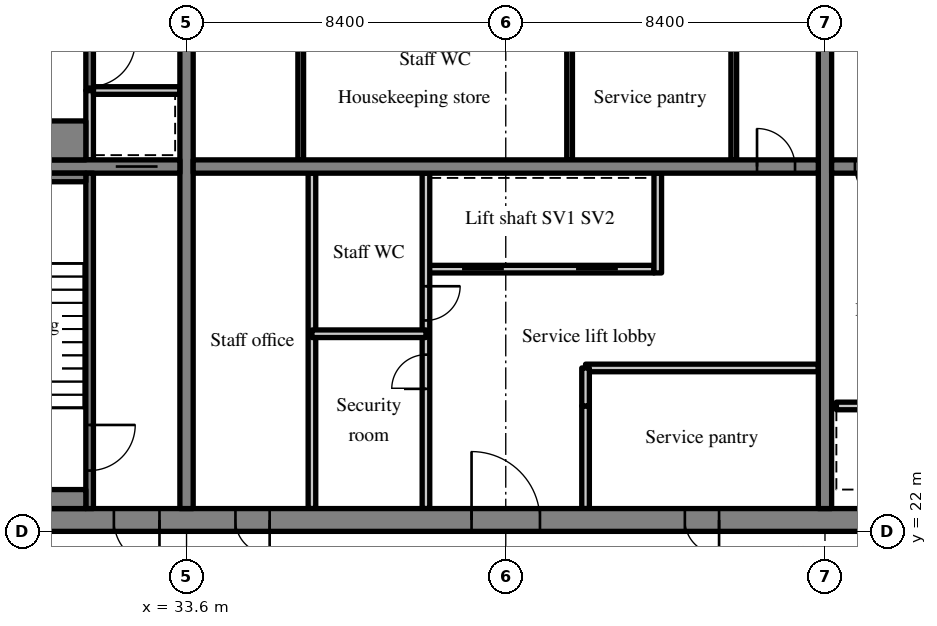
"""IFC4 building model, lengths in metres.
Left out: names, types, materials, properties, quantities, classifications, styles, units other than length and angle.
Written with IfcOpenShell. Run it as: python <this file> out.ifc"""

import sys

from ifc_helpers import new_model, si_unit, direction, frame, frame_2d, origin, place, context, subcontext, project, spatial, rectangle, extrude, source, transform, mapped, element, fill, save


model = new_model("IFC4")
c1 = context("Model", 3, precision=1e-05, world=origin(), true_north=direction((0.0, 1.0)))
c2 = subcontext(c1, "Body", "Model", "MODEL_VIEW")
j1 = project(units=[si_unit("LENGTHUNIT", "METRE"), si_unit("PLANEANGLEUNIT", "RADIAN")], contexts=[c1])
p1 = place(None, origin())
s1 = spatial("IfcSite", under=j1, at=p1, CompositionType="ELEMENT")
p2 = place(p1, origin())
s2 = spatial("IfcBuilding", under=s1, at=p2, CompositionType="ELEMENT")
p3 = place(p2, frame((0.0, 0.0, 245.2)))
s3 = spatial("IfcBuildingStorey", under=s2, at=p3, CompositionType="ELEMENT", Elevation=245.2)
m1 = source(origin(), c2, "Body", "SweptSolid", [
    extrude(rectangle(XDim=50.4, YDim=0.6, at=frame_2d((25.2, 0.0))), origin(), (0.0, 0.0, 1.0), 3.62),
])
p4 = place(p3, frame((25.2, 22.3, 0.0), z_axis=(0.0, 0.0, 1.0), x_axis=(1.0, 0.0, 0.0)))
e1 = element("IfcWall", 1, at=p4, inside=s3, PredefinedType="SHEAR", context=c2, shape_type="MappedRepresentation", body=[
    mapped(m1, transform((0.0, 0.0, 0.0), scale=1.0)),
])
m2 = source(origin(), c2, "Body", "SweptSolid", [
    extrude(rectangle(XDim=1.8, YDim=2.1, at=frame_2d((0.9, 1.05))), frame((0.0, 0.31, 0.0), z_axis=(0.0, -1.0, 0.0), x_axis=(1.0, 0.0, 0.0)), (0.0, 0.0, 1.0), 0.62),
])
p5 = place(p4, frame((15.9, 0.0, 0.0)))
e2 = element("IfcOpeningElement", 2, at=p5, cuts=e1, PredefinedType="OPENING", context=c2, shape_type="MappedRepresentation", body=[
    mapped(m2, transform((0.0, 0.0, 0.0), scale=1.0)),
])
m3 = source(origin(), c2, "Body", "SweptSolid", [
    extrude(rectangle(XDim=0.9, YDim=2.1, at=frame_2d((0.45, 1.05))), frame((0.0, 0.31, 0.0), z_axis=(0.0, -1.0, 0.0), x_axis=(1.0, 0.0, 0.0)), (0.0, 0.0, 1.0), 0.62),
])
p6 = place(p4, frame((9.687, 0.0, 0.0)))
e3 = element("IfcOpeningElement", 3, at=p6, cuts=e1, PredefinedType="OPENING", context=c2, shape_type="MappedRepresentation", body=[
    mapped(m3, transform((0.0, 0.0, 0.0), scale=1.0)),
])
p7 = place(p4, frame((21.513, 0.0, 0.0)))
e4 = element("IfcOpeningElement", 4, at=p7, cuts=e1, PredefinedType="OPENING", context=c2, shape_type="MappedRepresentation", body=[
    mapped(m3, transform((0.0, 0.0, 0.0), scale=1.0)),
])
p8 = place(p4, frame((32.7, 0.0, 0.0)))
e5 = element("IfcOpeningElement", 5, at=p8, cuts=e1, PredefinedType="OPENING", context=c2, shape_type="MappedRepresentation", body=[
    mapped(m2, transform((0.0, 0.0, 0.0), scale=1.0)),
])
m4 = source(origin(), c2, "Body", "SweptSolid", [
    extrude(rectangle(XDim=1.2, YDim=2.1, at=frame_2d((0.6, 1.05))), frame((0.0, 0.31, 0.0), z_axis=(0.0, -1.0, 0.0), x_axis=(1.0, 0.0, 0.0)), (0.0, 0.0, 1.0), 0.62),
])
p9 = place(p4, frame((6.488, 0.0, 0.0)))
e6 = element("IfcOpeningElement", 6, at=p9, cuts=e1, PredefinedType="OPENING", context=c2, shape_type="MappedRepresentation", body=[
    mapped(m4, transform((0.0, 0.0, 0.0), scale=1.0)),
])
p10 = place(p4, frame((47.925, 0.0, 0.0)))
e7 = element("IfcOpeningElement", 7, at=p10, cuts=e1, PredefinedType="OPENING", context=c2, shape_type="MappedRepresentation", body=[
    mapped(m4, transform((0.0, 0.0, 0.0), scale=1.0)),
])
m5 = source(origin(), c2, "Body", "SweptSolid", [
    extrude(rectangle(XDim=18.8, YDim=0.35, at=frame_2d((9.4, 0.0))), origin(), (0.0, 0.0, 1.0), 3.62),
])
p11 = place(p3, frame((33.6, 22.6, 0.0), z_axis=(0.0, 0.0, 1.0), x_axis=(0.0, 1.0, 0.0)))
e8 = element("IfcWall", 8, at=p11, inside=s3, PredefinedType="SHEAR", context=c2, shape_type="MappedRepresentation", body=[
    mapped(m5, transform((0.0, 0.0, 0.0), scale=1.0)),
])
m6 = source(origin(), c2, "Body", "SweptSolid", [
    extrude(rectangle(XDim=1.1, YDim=2.1, at=frame_2d((0.55, 1.05))), frame((0.0, 0.185, 0.0), z_axis=(0.0, -1.0, 0.0), x_axis=(1.0, 0.0, 0.0)), (0.0, 0.0, 1.0), 0.37),
])
p12 = place(p11, frame((12.85, 0.0, 0.0)))
e9 = element("IfcOpeningElement", 9, at=p12, cuts=e8, PredefinedType="OPENING", context=c2, shape_type="MappedRepresentation", body=[
    mapped(m6, transform((0.0, 0.0, 0.0), scale=1.0)),
])
p13 = place(p3, frame((50.4, 22.6, 0.0), z_axis=(0.0, 0.0, 1.0), x_axis=(0.0, 1.0, 0.0)))
e10 = element("IfcWall", 10, at=p13, inside=s3, PredefinedType="SHEAR", context=c2, shape_type="MappedRepresentation", body=[
    mapped(m5, transform((0.0, 0.0, 0.0), scale=1.0)),
])
p14 = place(p13, frame((12.85, 0.0, 0.0)))
e11 = element("IfcOpeningElement", 11, at=p14, cuts=e10, PredefinedType="OPENING", context=c2, shape_type="MappedRepresentation", body=[
    mapped(m6, transform((0.0, 0.0, 0.0), scale=1.0)),
])
m7 = source(origin(), c2, "Body", "SweptSolid", [
    extrude(rectangle(XDim=7.625, YDim=0.35, at=frame_2d((3.812, 0.0))), origin(), (0.0, 0.0, 1.0), 3.62),
])
p15 = place(p3, frame((25.8, 31.6, 0.0), z_axis=(0.0, 0.0, 1.0), x_axis=(1.0, 0.0, 0.0)))
e12 = element("IfcWall", 12, at=p15, inside=s3, PredefinedType="SHEAR", context=c2, shape_type="MappedRepresentation", body=[
    mapped(m7, transform((0.0, 0.0, 0.0), scale=1.0)),
])
p16 = place(p15, frame((5.938, 0.0, 0.0)))
e13 = element("IfcOpeningElement", 13, at=p16, cuts=e12, PredefinedType="OPENING", context=c2, shape_type="MappedRepresentation", body=[
    mapped(m6, transform((0.0, 0.0, 0.0), scale=1.0)),
])
m8 = source(origin(), c2, "Body", "SweptSolid", [
    extrude(rectangle(XDim=16.45, YDim=0.35, at=frame_2d((8.225, 0.0))), origin(), (0.0, 0.0, 1.0), 3.62),
])
p17 = place(p3, frame((33.775, 31.6, 0.0), z_axis=(0.0, 0.0, 1.0), x_axis=(1.0, 0.0, 0.0)))
e14 = element("IfcWall", 14, at=p17, inside=s3, PredefinedType="SHEAR", context=c2, shape_type="MappedRepresentation", body=[
    mapped(m8, transform((0.0, 0.0, 0.0), scale=1.0)),
])
m9 = source(origin(), c2, "Body", "SweptSolid", [
    extrude(rectangle(XDim=1.0, YDim=2.1, at=frame_2d((0.5, 1.05))), frame((0.0, 0.185, 0.0), z_axis=(0.0, -1.0, 0.0), x_axis=(1.0, 0.0, 0.0)), (0.0, 0.0, 1.0), 0.37),
])
p18 = place(p17, frame((14.837, 0.0, 0.0)))
e15 = element("IfcOpeningElement", 15, at=p18, cuts=e14, PredefinedType="OPENING", context=c2, shape_type="MappedRepresentation", body=[
    mapped(m9, transform((0.0, 0.0, 0.0), scale=1.0)),
])
m10 = source(origin(), c2, "Body", "SweptSolid", [
    extrude(rectangle(XDim=16.45, YDim=0.35, at=frame_2d((8.225, 0.0))), origin(), (0.0, 0.0, 1.0), 3.62),
])
p19 = place(p3, frame((50.575, 31.6, 0.0), z_axis=(0.0, 0.0, 1.0), x_axis=(1.0, 0.0, 0.0)))
e16 = element("IfcWall", 16, at=p19, inside=s3, PredefinedType="SHEAR", context=c2, shape_type="MappedRepresentation", body=[
    mapped(m10, transform((0.0, 0.0, 0.0), scale=1.0)),
])
p20 = place(p19, frame((0.613, 0.0, 0.0)))
e17 = element("IfcOpeningElement", 17, at=p20, cuts=e16, PredefinedType="OPENING", context=c2, shape_type="MappedRepresentation", body=[
    mapped(m9, transform((0.0, 0.0, 0.0), scale=1.0)),
])
m11 = source(origin(), c2, "Body", "SweptSolid", [
    extrude(rectangle(XDim=6.0, YDim=0.2, at=frame_2d((3.0, 0.0))), origin(), (0.0, 0.0, 1.0), 3.62),
])
p21 = place(p3, frame((39.9, 28.9, 0.0), z_axis=(0.0, 0.0, 1.0), x_axis=(1.0, 0.0, 0.0)))
e18 = element("IfcWall", 18, at=p21, inside=s3, PredefinedType="SOLIDWALL", context=c2, shape_type="MappedRepresentation", body=[
    mapped(m11, transform((0.0, 0.0, 0.0), scale=1.0)),
])
m12 = source(origin(), c2, "Body", "SweptSolid", [
    extrude(rectangle(XDim=1.1, YDim=2.1, at=frame_2d((0.55, 1.05))), frame((0.0, 0.11, 0.0), z_axis=(0.0, -1.0, 0.0), x_axis=(1.0, 0.0, 0.0)), (0.0, 0.0, 1.0), 0.22),
])
p22 = place(p21, frame((0.95, 0.0, 0.0)))
e19 = element("IfcOpeningElement", 19, at=p22, cuts=e18, PredefinedType="OPENING", context=c2, shape_type="MappedRepresentation", body=[
    mapped(m12, transform((0.0, 0.0, 0.0), scale=1.0)),
])
p23 = place(p21, frame((3.95, 0.0, 0.0)))
e20 = element("IfcOpeningElement", 20, at=p23, cuts=e18, PredefinedType="OPENING", context=c2, shape_type="MappedRepresentation", body=[
    mapped(m12, transform((0.0, 0.0, 0.0), scale=1.0)),
])
m13 = source(origin(), c2, "Body", "SweptSolid", [
    extrude(rectangle(XDim=8.825, YDim=0.2, at=frame_2d((4.413, 0.0))), origin(), (0.0, 0.0, 1.0), 3.62),
])
p24 = place(p3, frame((39.9, 22.6, 0.0), z_axis=(0.0, 0.0, 1.0), x_axis=(0.0, 1.0, 0.0)))
e21 = element("IfcWall", 21, at=p24, inside=s3, PredefinedType="PARTITIONING", context=c2, shape_type="MappedRepresentation", body=[
    mapped(m13, transform((0.0, 0.0, 0.0), scale=1.0)),
])
m14 = source(origin(), c2, "Body", "SweptSolid", [
    extrude(rectangle(XDim=0.9, YDim=2.1, at=frame_2d((0.45, 1.05))), frame((0.0, 0.11, 0.0), z_axis=(0.0, -1.0, 0.0), x_axis=(1.0, 0.0, 0.0)), (0.0, 0.0, 1.0), 0.22),
])
p25 = place(p24, frame((3.15, 0.0, 0.0)))
e22 = element("IfcOpeningElement", 22, at=p25, cuts=e21, PredefinedType="OPENING", context=c2, shape_type="MappedRepresentation", body=[
    mapped(m14, transform((0.0, 0.0, 0.0), scale=1.0)),
])
p26 = place(p24, frame((4.95, 0.0, 0.0)))
e23 = element("IfcOpeningElement", 23, at=p26, cuts=e21, PredefinedType="OPENING", context=c2, shape_type="MappedRepresentation", body=[
    mapped(m14, transform((0.0, 0.0, 0.0), scale=1.0)),
])
m15 = source(origin(), c2, "Body", "SweptSolid", [
    extrude(rectangle(XDim=2.7, YDim=0.2, at=frame_2d((1.35, 0.0))), origin(), (0.0, 0.0, 1.0), 3.62),
])
p27 = place(p3, frame((44.1, 22.6, 0.0), z_axis=(0.0, 0.0, 1.0), x_axis=(0.0, 1.0, 0.0)))
e24 = element("IfcWall", 24, at=p27, inside=s3, PredefinedType="PARTITIONING", context=c2, shape_type="MappedRepresentation", body=[
    mapped(m15, transform((0.0, 0.0, 0.0), scale=1.0)),
])
m16 = source(origin(), c2, "Body", "SweptSolid", [
    extrude(rectangle(XDim=2.625, YDim=0.2, at=frame_2d((1.312, 0.0))), origin(), (0.0, 0.0, 1.0), 3.62),
])
p28 = place(p3, frame((46.0, 28.8, 0.0), z_axis=(0.0, 0.0, 1.0), x_axis=(0.0, 1.0, 0.0)))
e25 = element("IfcWall", 25, at=p28, inside=s3, PredefinedType="SOLIDWALL", context=c2, shape_type="MappedRepresentation", body=[
    mapped(m16, transform((0.0, 0.0, 0.0), scale=1.0)),
])
p29 = place(p3, frame((36.9, 22.6, 0.0), z_axis=(0.0, 0.0, 1.0), x_axis=(0.0, 1.0, 0.0)))
e26 = element("IfcWall", 26, at=p29, inside=s3, PredefinedType="PARTITIONING", context=c2, shape_type="MappedRepresentation", body=[
    mapped(m13, transform((0.0, 0.0, 0.0), scale=1.0)),
])
m17 = source(origin(), c2, "Body", "SweptSolid", [
    extrude(rectangle(XDim=3.0, YDim=0.2, at=frame_2d((1.5, 0.0))), origin(), (0.0, 0.0, 1.0), 3.62),
])
p30 = place(p3, frame((36.9, 27.2, 0.0), z_axis=(0.0, 0.0, 1.0), x_axis=(1.0, 0.0, 0.0)))
e27 = element("IfcWall", 27, at=p30, inside=s3, PredefinedType="PARTITIONING", context=c2, shape_type="MappedRepresentation", body=[
    mapped(m17, transform((0.0, 0.0, 0.0), scale=1.0)),
])
m18 = source(origin(), c2, "Body", "SweptSolid", [
    extrude(rectangle(XDim=6.125, YDim=0.2, at=frame_2d((3.062, 0.0))), origin(), (0.0, 0.0, 1.0), 3.62),
])
p31 = place(p3, frame((44.1, 26.3, 0.0), z_axis=(0.0, 0.0, 1.0), x_axis=(1.0, 0.0, 0.0)))
e28 = element("IfcWall", 28, at=p31, inside=s3, PredefinedType="PARTITIONING", context=c2, shape_type="MappedRepresentation", body=[
    mapped(m18, transform((0.0, 0.0, 0.0), scale=1.0)),
])
m19 = source(origin(), c2, "Body", "SweptSolid", [
    extrude(rectangle(XDim=1.0, YDim=0.2, at=frame_2d((0.5, 0.0))), origin(), (0.0, 0.0, 1.0), 3.62),
])
p32 = place(p3, frame((44.1, 25.3, 0.0), z_axis=(0.0, 0.0, 1.0), x_axis=(0.0, 1.0, 0.0)))
e29 = element("IfcWall", 29, at=p32, inside=s3, PredefinedType="PARTITIONING", context=c2, shape_type="MappedRepresentation", body=[
    mapped(m19, transform((0.0, 0.0, 0.0), scale=1.0)),
])
m20 = source(origin(), c2, "Body", "SweptSolid", [
    extrude(rectangle(XDim=3.225, YDim=0.15, at=frame_2d((1.613, 0.0))), origin(), (0.0, 0.0, 1.0), 3.62),
])
for number, where, z_axis, x_axis in (
    (30, (48.0, 31.775, 0.0), (0.0, 0.0, 1.0), (0.0, 1.0, 0.0)),
    (31, (36.605, 31.775, 0.0), (0.0, 0.0, 1.0), (0.0, 1.0, 0.0)),
    (32, (43.68, 31.775, 0.0), (0.0, 0.0, 1.0), (0.0, 1.0, 0.0)),
):
    element("IfcWall", number, at=place(p3, frame(where, z_axis=z_axis, x_axis=x_axis)), inside=s3, PredefinedType="PARTITIONING", context=c2, shape_type="MappedRepresentation", body=[
        mapped(m20, transform((0.0, 0.0, 0.0), scale=1.0)),
    ])
p33 = place(p3, frame((56.7, 25.3, 0.0), z_axis=(0.0, 0.0, 1.0), x_axis=(-1.0, 0.0, 0.0)))
e33 = element("IfcWall", 33, at=p33, inside=s3, PredefinedType="SOLIDWALL", context=c2, shape_type="MappedRepresentation", body=[
    mapped(m11, transform((0.0, 0.0, 0.0), scale=1.0)),
])
p34 = place(p33, frame((0.95, 0.0, 0.0)))
e34 = element("IfcOpeningElement", 34, at=p34, cuts=e33, PredefinedType="OPENING", context=c2, shape_type="MappedRepresentation", body=[
    mapped(m12, transform((0.0, 0.0, 0.0), scale=1.0)),
])
p35 = place(p33, frame((3.95, 0.0, 0.0)))
e35 = element("IfcOpeningElement", 35, at=p35, cuts=e33, PredefinedType="OPENING", context=c2, shape_type="MappedRepresentation", body=[
    mapped(m12, transform((0.0, 0.0, 0.0), scale=1.0)),
])
m21 = source(origin(), c2, "Body", "SweptSolid", [
    extrude(rectangle(XDim=8.825, YDim=0.2, at=frame_2d((4.413, 0.0))), origin(), (0.0, 0.0, 1.0), 3.62),
])
p36 = place(p3, frame((31.05, 22.6, 0.0), z_axis=(0.0, 0.0, 1.0), x_axis=(0.0, 1.0, 0.0)))
e36 = element("IfcWall", 36, at=p36, inside=s3, PredefinedType="SOLIDWALL", context=c2, shape_type="MappedRepresentation", body=[
    mapped(m21, transform((0.0, 0.0, 0.0), scale=1.0)),
])
m22 = source(origin(), c2, "Body", "SweptSolid", [
    extrude(rectangle(XDim=1.2, YDim=2.1, at=frame_2d((0.6, 1.05))), frame((0.0, 0.11, 0.0), z_axis=(0.0, -1.0, 0.0), x_axis=(1.0, 0.0, 0.0)), (0.0, 0.0, 1.0), 0.22),
])
p37 = place(p36, frame((1.0, 0.0, 0.0)))
e37 = element("IfcOpeningElement", 37, at=p37, cuts=e36, PredefinedType="OPENING", context=c2, shape_type="MappedRepresentation", body=[
    mapped(m22, transform((0.0, 0.0, 0.0), scale=1.0)),
])
m23 = source(origin(), c2, "Body", "SweptSolid", [
    extrude(rectangle(XDim=1.825, YDim=0.2, at=frame_2d((0.913, 0.0))), origin(), (0.0, 0.0, 1.0), 3.62),
])
p38 = place(p3, frame((31.05, 31.775, 0.0), z_axis=(0.0, 0.0, 1.0), x_axis=(0.0, 1.0, 0.0)))
e38 = element("IfcWall", 38, at=p38, inside=s3, PredefinedType="SOLIDWALL", context=c2, shape_type="MappedRepresentation", body=[
    mapped(m23, transform((0.0, 0.0, 0.0), scale=1.0)),
])
m24 = source(origin(), c2, "Body", "SweptSolid", [
    extrude(rectangle(XDim=2.275, YDim=0.2, at=frame_2d((1.138, 0.0))), origin(), (0.0, 0.0, 1.0), 3.62),
])
p39 = place(p3, frame((31.15, 33.6, 0.0), z_axis=(0.0, 0.0, 1.0), x_axis=(1.0, 0.0, 0.0)))
e39 = element("IfcWall", 39, at=p39, inside=s3, PredefinedType="SOLIDWALL", context=c2, shape_type="MappedRepresentation", body=[
    mapped(m24, transform((0.0, 0.0, 0.0), scale=1.0)),
])
m25 = source(origin(), c2, "Body", "SweptSolid", [
    extrude(rectangle(XDim=7.8, YDim=0.2, at=frame_2d((3.9, 0.0))), origin(), (0.0, 0.0, 1.0), 3.62),
])
p40 = place(p3, frame((31.05, 33.6, 0.0), z_axis=(0.0, 0.0, 1.0), x_axis=(0.0, 1.0, 0.0)))
e40 = element("IfcWall", 40, at=p40, inside=s3, PredefinedType="SOLIDWALL", context=c2, shape_type="MappedRepresentation", body=[
    mapped(m25, transform((0.0, 0.0, 0.0), scale=1.0)),
])
p41 = place(p40, frame((0.1, 0.0, 0.0)))
e41 = element("IfcOpeningElement", 41, at=p41, cuts=e40, PredefinedType="OPENING", context=c2, shape_type="MappedRepresentation", body=[
    mapped(m22, transform((0.0, 0.0, 0.0), scale=1.0)),
])
m26 = source(origin(), c2, "Body", "SweptSolid", [
    extrude(rectangle(XDim=5.15, YDim=0.5, at=frame_2d((2.575, 0.0))), origin(), (0.0, 0.0, 1.0), 3.62),
])
p42 = place(p3, frame((25.8, 22.85, 0.0), z_axis=(0.0, 0.0, 1.0), x_axis=(1.0, 0.0, 0.0)))
e42 = element("IfcWall", 42, at=p42, inside=s3, PredefinedType="SOLIDWALL", context=c2, shape_type="MappedRepresentation", body=[
    mapped(m26, transform((0.0, 0.0, 0.0), scale=1.0)),
])
m27 = source(origin(), c2, "Body", "SweptSolid", [
    extrude(rectangle(XDim=5.15, YDim=0.225, at=frame_2d((2.575, 0.0))), origin(), (0.0, 0.0, 1.0), 3.62),
])
p43 = place(p3, frame((25.8, 31.312, 0.0), z_axis=(0.0, 0.0, 1.0), x_axis=(1.0, 0.0, 0.0)))
e43 = element("IfcWall", 43, at=p43, inside=s3, PredefinedType="SOLIDWALL", context=c2, shape_type="MappedRepresentation", body=[
    mapped(m27, transform((0.0, 0.0, 0.0), scale=1.0)),
])
m28 = source(origin(), c2, "Body", "SweptSolid", [
    extrude(rectangle(XDim=5.15, YDim=1.025, at=frame_2d((2.575, 0.0))), origin(), (0.0, 0.0, 1.0), 3.62),
])
p44 = place(p3, frame((25.8, 32.287, 0.0), z_axis=(0.0, 0.0, 1.0), x_axis=(1.0, 0.0, 0.0)))
e44 = element("IfcWall", 44, at=p44, inside=s3, PredefinedType="SOLIDWALL", context=c2, shape_type="MappedRepresentation", body=[
    mapped(m28, transform((0.0, 0.0, 0.0), scale=1.0)),
])
m29 = source(origin(), c2, "Body", "SweptSolid", [
    extrude(rectangle(XDim=1.8, YDim=2.1, at=frame_2d((0.9, 1.05))), frame((0.0, 0.225, 0.0), z_axis=(0.0, -1.0, 0.0), x_axis=(1.0, 0.0, 0.0)), (0.0, 0.0, 1.0), 0.05),
])
p45 = place(p5, origin())
e45 = element("IfcDoor", 45, at=p45, inside=s3, OperationType="DOUBLE_DOOR_SINGLE_SWING", PredefinedType="DOOR", context=c2, shape_type="MappedRepresentation", body=[
    mapped(m29, transform((0.0, 0.0, 0.0), scale=1.0)),
])
fill(e2, e45)
m30 = source(origin(), c2, "Body", "SweptSolid", [
    extrude(rectangle(XDim=1.0, YDim=2.1, at=frame_2d((0.5, 1.05))), frame((0.0, 0.025, 0.0), z_axis=(0.0, -1.0, 0.0), x_axis=(1.0, 0.0, 0.0)), (0.0, 0.0, 1.0), 0.05),
])
p46 = place(p18, origin())
e46 = element("IfcDoor", 46, at=p46, inside=s3, OperationType="SINGLE_SWING_LEFT", PredefinedType="DOOR", context=c2, shape_type="MappedRepresentation", body=[
    mapped(m30, transform((0.0, 0.0, 0.0), scale=1.0)),
])
fill(e15, e46)
m31 = source(origin(), c2, "Body", "SweptSolid", [
    extrude(rectangle(XDim=1.1, YDim=2.1, at=frame_2d((0.55, 1.05))), frame((0.0, 0.025, 0.0), z_axis=(0.0, -1.0, 0.0), x_axis=(1.0, 0.0, 0.0)), (0.0, 0.0, 1.0), 0.05),
])
p47 = place(p22, origin())
e47 = element("IfcDoor", 47, at=p47, inside=s3, OperationType="SLIDING_TO_LEFT", PredefinedType="DOOR", context=c2, shape_type="MappedRepresentation", body=[
    mapped(m31, transform((0.0, 0.0, 0.0), scale=1.0)),
])
fill(e19, e47)
p48 = place(p23, origin())
e48 = element("IfcDoor", 48, at=p48, inside=s3, OperationType="SLIDING_TO_RIGHT", PredefinedType="DOOR", context=c2, shape_type="MappedRepresentation", body=[
    mapped(m31, transform((0.0, 0.0, 0.0), scale=1.0)),
])
fill(e20, e48)
m32 = source(origin(), c2, "Body", "SweptSolid", [
    extrude(rectangle(XDim=0.9, YDim=2.1, at=frame_2d((0.45, 1.05))), frame((0.0, 0.225, 0.0), z_axis=(0.0, -1.0, 0.0), x_axis=(1.0, 0.0, 0.0)), (0.0, 0.0, 1.0), 0.05),
])
p49 = place(p6, origin())
e49 = element("IfcDoor", 49, at=p49, inside=s3, OperationType="SINGLE_SWING_RIGHT", PredefinedType="DOOR", context=c2, shape_type="MappedRepresentation", body=[
    mapped(m32, transform((0.0, 0.0, 0.0), scale=1.0)),
])
fill(e3, e49)
m33 = source(origin(), c2, "Body", "SweptSolid", [
    extrude(rectangle(XDim=0.9, YDim=2.1, at=frame_2d((0.45, 1.05))), frame((0.0, 0.025, 0.0), z_axis=(0.0, -1.0, 0.0), x_axis=(1.0, 0.0, 0.0)), (0.0, 0.0, 1.0), 0.05),
])
p50 = place(p25, origin())
e50 = element("IfcDoor", 50, at=p50, inside=s3, OperationType="SINGLE_SWING_LEFT", PredefinedType="DOOR", context=c2, shape_type="MappedRepresentation", body=[
    mapped(m33, transform((0.0, 0.0, 0.0), scale=1.0)),
])
fill(e22, e50)
p51 = place(p26, origin())
e51 = element("IfcDoor", 51, at=p51, inside=s3, OperationType="SINGLE_SWING_RIGHT", PredefinedType="DOOR", context=c2, shape_type="MappedRepresentation", body=[
    mapped(m33, transform((0.0, 0.0, 0.0), scale=1.0)),
])
fill(e23, e51)
p52 = place(p7, origin())
e52 = element("IfcDoor", 52, at=p52, inside=s3, OperationType="SINGLE_SWING_RIGHT", PredefinedType="DOOR", context=c2, shape_type="MappedRepresentation", body=[
    mapped(m32, transform((0.0, 0.0, 0.0), scale=1.0)),
])
fill(e4, e52)
p53 = place(p20, origin())
e53 = element("IfcDoor", 53, at=p53, inside=s3, OperationType="SINGLE_SWING_RIGHT", PredefinedType="DOOR", context=c2, shape_type="MappedRepresentation", body=[
    mapped(m30, transform((0.0, 0.0, 0.0), scale=1.0)),
])
fill(e17, e53)
m34 = source(origin(), c2, "Body", "SweptSolid", [
    extrude(rectangle(XDim=1.2, YDim=2.1, at=frame_2d((0.6, 1.05))), frame((0.0, 0.025, 0.0), z_axis=(0.0, -1.0, 0.0), x_axis=(1.0, 0.0, 0.0)), (0.0, 0.0, 1.0), 0.05),
])
p54 = place(p37, origin())
e54 = element("IfcDoor", 54, at=p54, inside=s3, OperationType="SINGLE_SWING_RIGHT", PredefinedType="DOOR", context=c2, shape_type="MappedRepresentation", body=[
    mapped(m34, transform((0.0, 0.0, 0.0), scale=1.0)),
])
fill(e37, e54)
m35 = source(origin(), c2, "Body", "SweptSolid", [
    extrude(rectangle(XDim=1.2, YDim=2.1, at=frame_2d((0.6, 1.05))), frame((0.0, 0.225, 0.0), z_axis=(0.0, -1.0, 0.0), x_axis=(1.0, 0.0, 0.0)), (0.0, 0.0, 1.0), 0.05),
])
p55 = place(p9, origin())
e55 = element("IfcDoor", 55, at=p55, inside=s3, OperationType="SINGLE_SWING_RIGHT", PredefinedType="DOOR", context=c2, shape_type="MappedRepresentation", body=[
    mapped(m35, transform((0.0, 0.0, 0.0), scale=1.0)),
])
fill(e6, e55)
p56 = place(p16, origin())
e56 = element("IfcDoor", 56, at=p56, inside=s3, OperationType="SLIDING_TO_RIGHT", PredefinedType="DOOR", context=c2, shape_type="MappedRepresentation", body=[
    mapped(m31, transform((0.0, 0.0, 0.0), scale=1.0)),
])
fill(e13, e56)
p57 = place(p41, origin())
e57 = element("IfcDoor", 57, at=p57, inside=s3, OperationType="SINGLE_SWING_RIGHT", PredefinedType="DOOR", context=c2, shape_type="MappedRepresentation", body=[
    mapped(m34, transform((0.0, 0.0, 0.0), scale=1.0)),
])
fill(e41, e57)
save(model, sys.argv[1])
